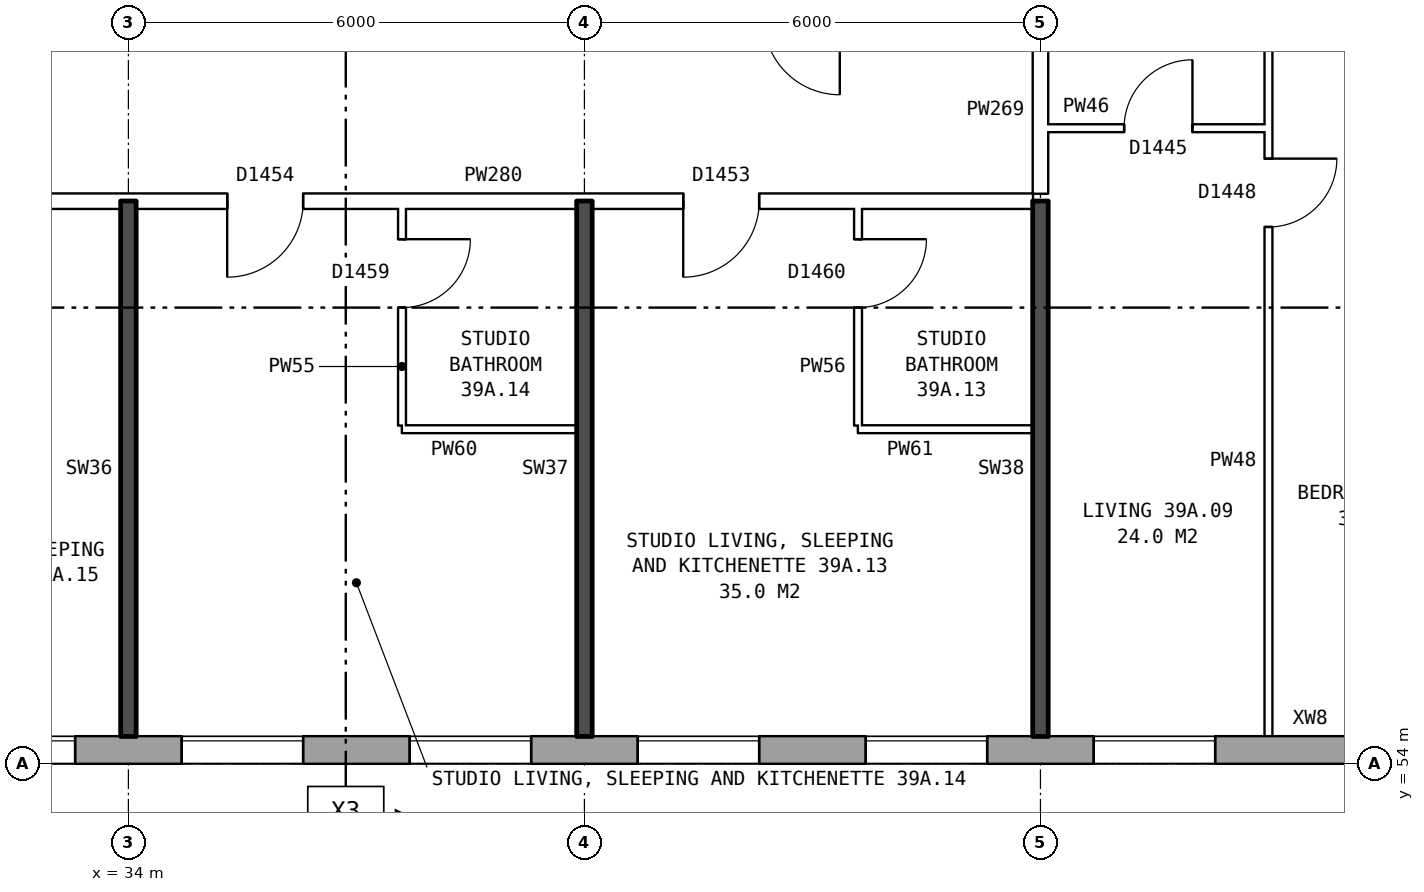
"""IFC4 building model, lengths in metres.
Left out: names, types, materials, properties, quantities, classifications, styles, units other than length and angle.
Written with IfcOpenShell. Run it as: python <this file> out.ifc"""

import sys

from ifc_helpers import new_model, si_unit, direction, frame, frame_2d, origin, place, context, subcontext, project, spatial, rectangle, extrude, element, fill, save


model = new_model("IFC4")
c1 = context("Model", 3, precision=1e-05, world=origin(), true_north=direction((0.0, 1.0)))
c2 = subcontext(c1, "Body", "Model", "MODEL_VIEW")
j1 = project(units=[si_unit("LENGTHUNIT", "METRE"), si_unit("PLANEANGLEUNIT", "RADIAN")], contexts=[c1])
p1 = place(None, origin())
s1 = spatial("IfcSite", under=j1, at=p1, CompositionType="ELEMENT")
p2 = place(p1, origin())
s2 = spatial("IfcBuilding", under=s1, at=p2, CompositionType="ELEMENT")
p3 = place(p2, frame((0.0, 0.0, 139.2)))
s3 = spatial("IfcBuildingStorey", under=s2, at=p3, CompositionType="ELEMENT", Elevation=139.2)
p4 = place(p3, frame((29.825, 54.18, 0.0), z_axis=(0.0, 0.0, 1.0), x_axis=(1.0, 0.0, 0.0)))
e1 = element("IfcWall", 1, at=p4, inside=s3, PredefinedType="STANDARD", context=c2, shape_type="SweptSolid", body=[
    extrude(rectangle(XDim=43.101, YDim=0.36, at=frame_2d((21.55, 0.0))), origin(), (0.0, 0.0, 1.0), 2.85),
])
p5 = place(p4, frame((1.875, 0.0, 0.8)))
e2 = element("IfcOpeningElement", 2, at=p5, cuts=e1, PredefinedType="OPENING", context=c2, shape_type="SweptSolid", body=[
    extrude(rectangle(XDim=1.6, YDim=1.8, at=frame_2d((0.8, 0.9))), frame((0.0, 0.19, 0.0), z_axis=(0.0, -1.0, 0.0), x_axis=(1.0, 0.0, 0.0)), (0.0, 0.0, 1.0), 0.38),
])
p6 = place(p4, frame((4.875, 0.0, 0.8)))
e3 = element("IfcOpeningElement", 3, at=p6, cuts=e1, PredefinedType="OPENING", context=c2, shape_type="SweptSolid", body=[
    extrude(rectangle(XDim=1.6, YDim=1.8, at=frame_2d((0.8, 0.9))), frame((0.0, 0.19, 0.0), z_axis=(0.0, -1.0, 0.0), x_axis=(1.0, 0.0, 0.0)), (0.0, 0.0, 1.0), 0.38),
])
p7 = place(p4, frame((7.875, 0.0, 0.8)))
e4 = element("IfcOpeningElement", 4, at=p7, cuts=e1, PredefinedType="OPENING", context=c2, shape_type="SweptSolid", body=[
    extrude(rectangle(XDim=1.6, YDim=1.8, at=frame_2d((0.8, 0.9))), frame((0.0, 0.19, 0.0), z_axis=(0.0, -1.0, 0.0), x_axis=(1.0, 0.0, 0.0)), (0.0, 0.0, 1.0), 0.38),
])
p8 = place(p4, frame((10.875, 0.0, 0.8)))
e5 = element("IfcOpeningElement", 5, at=p8, cuts=e1, PredefinedType="OPENING", context=c2, shape_type="SweptSolid", body=[
    extrude(rectangle(XDim=1.6, YDim=1.8, at=frame_2d((0.8, 0.9))), frame((0.0, 0.19, 0.0), z_axis=(0.0, -1.0, 0.0), x_axis=(1.0, 0.0, 0.0)), (0.0, 0.0, 1.0), 0.38),
])
p9 = place(p4, frame((13.875, 0.0, 0.8)))
e6 = element("IfcOpeningElement", 6, at=p9, cuts=e1, PredefinedType="OPENING", context=c2, shape_type="SweptSolid", body=[
    extrude(rectangle(XDim=1.6, YDim=1.8, at=frame_2d((0.8, 0.9))), frame((0.0, 0.19, 0.0), z_axis=(0.0, -1.0, 0.0), x_axis=(1.0, 0.0, 0.0)), (0.0, 0.0, 1.0), 0.38),
])
p10 = place(p4, frame((16.875, 0.0, 0.8)))
e7 = element("IfcOpeningElement", 7, at=p10, cuts=e1, PredefinedType="OPENING", context=c2, shape_type="SweptSolid", body=[
    extrude(rectangle(XDim=1.6, YDim=1.8, at=frame_2d((0.8, 0.9))), frame((0.0, 0.19, 0.0), z_axis=(0.0, -1.0, 0.0), x_axis=(1.0, 0.0, 0.0)), (0.0, 0.0, 1.0), 0.38),
])
p11 = place(p4, frame((20.975, 0.0, 0.15)))
e8 = element("IfcOpeningElement", 8, at=p11, cuts=e1, PredefinedType="OPENING", context=c2, shape_type="SweptSolid", body=[
    extrude(rectangle(XDim=1.0, YDim=1.5, at=frame_2d((0.5, 0.75))), frame((0.0, 0.19, 0.0), z_axis=(0.0, -1.0, 0.0), x_axis=(1.0, 0.0, 0.0)), (0.0, 0.0, 1.0), 0.38),
])
p12 = place(p4, frame((23.225, 0.0, 1.7)))
e9 = element("IfcOpeningElement", 9, at=p12, cuts=e1, PredefinedType="OPENING", context=c2, shape_type="SweptSolid", body=[
    extrude(rectangle(XDim=0.6, YDim=0.9, at=frame_2d((0.3, 0.45))), frame((0.0, 0.19, 0.0), z_axis=(0.0, -1.0, 0.0), x_axis=(1.0, 0.0, 0.0)), (0.0, 0.0, 1.0), 0.38),
])
p13 = place(p4, frame((25.875, 0.0, 0.8)))
e10 = element("IfcOpeningElement", 10, at=p13, cuts=e1, PredefinedType="OPENING", context=c2, shape_type="SweptSolid", body=[
    extrude(rectangle(XDim=1.6, YDim=1.8, at=frame_2d((0.8, 0.9))), frame((0.0, 0.19, 0.0), z_axis=(0.0, -1.0, 0.0), x_axis=(1.0, 0.0, 0.0)), (0.0, 0.0, 1.0), 0.38),
])
p14 = place(p4, frame((28.875, 0.0, 0.8)))
e11 = element("IfcOpeningElement", 11, at=p14, cuts=e1, PredefinedType="OPENING", context=c2, shape_type="SweptSolid", body=[
    extrude(rectangle(XDim=1.6, YDim=1.8, at=frame_2d((0.8, 0.9))), frame((0.0, 0.19, 0.0), z_axis=(0.0, -1.0, 0.0), x_axis=(1.0, 0.0, 0.0)), (0.0, 0.0, 1.0), 0.38),
])
p15 = place(p4, frame((31.875, 0.0, 0.8)))
e12 = element("IfcOpeningElement", 12, at=p15, cuts=e1, PredefinedType="OPENING", context=c2, shape_type="SweptSolid", body=[
    extrude(rectangle(XDim=1.6, YDim=1.8, at=frame_2d((0.8, 0.9))), frame((0.0, 0.19, 0.0), z_axis=(0.0, -1.0, 0.0), x_axis=(1.0, 0.0, 0.0)), (0.0, 0.0, 1.0), 0.38),
])
p16 = place(p4, frame((34.875, 0.0, 0.8)))
e13 = element("IfcOpeningElement", 13, at=p16, cuts=e1, PredefinedType="OPENING", context=c2, shape_type="SweptSolid", body=[
    extrude(rectangle(XDim=1.6, YDim=1.8, at=frame_2d((0.8, 0.9))), frame((0.0, 0.19, 0.0), z_axis=(0.0, -1.0, 0.0), x_axis=(1.0, 0.0, 0.0)), (0.0, 0.0, 1.0), 0.38),
])
p17 = place(p4, frame((37.875, 0.0, 0.8)))
e14 = element("IfcOpeningElement", 14, at=p17, cuts=e1, PredefinedType="OPENING", context=c2, shape_type="SweptSolid", body=[
    extrude(rectangle(XDim=1.6, YDim=1.8, at=frame_2d((0.8, 0.9))), frame((0.0, 0.19, 0.0), z_axis=(0.0, -1.0, 0.0), x_axis=(1.0, 0.0, 0.0)), (0.0, 0.0, 1.0), 0.38),
])
p18 = place(p4, frame((40.875, 0.0, 0.8)))
e15 = element("IfcOpeningElement", 15, at=p18, cuts=e1, PredefinedType="OPENING", context=c2, shape_type="SweptSolid", body=[
    extrude(rectangle(XDim=1.6, YDim=1.8, at=frame_2d((0.8, 0.9))), frame((0.0, 0.19, 0.0), z_axis=(0.0, -1.0, 0.0), x_axis=(1.0, 0.0, 0.0)), (0.0, 0.0, 1.0), 0.38),
])
p19 = place(p4, frame((24.225, 0.0, 0.8)))
e16 = element("IfcOpeningElement", 16, at=p19, cuts=e1, PredefinedType="OPENING", context=c2, shape_type="SweptSolid", body=[
    extrude(rectangle(XDim=0.8, YDim=1.8, at=frame_2d((0.4, 0.9))), frame((0.0, 0.19, 0.0), z_axis=(0.0, -1.0, 0.0), x_axis=(1.0, 0.0, 0.0)), (0.0, 0.0, 1.0), 0.38),
])
for number, where, z_axis, x_axis in (
    (17, (37.6, 58.4, 0.0), (0.0, 0.0, 1.0), (1.0, 0.0, 0.0)),
    (18, (43.6, 58.4, 0.0), (0.0, 0.0, 1.0), (1.0, 0.0, 0.0)),
):
    element("IfcWall", number, at=place(p3, frame(where, z_axis=z_axis, x_axis=x_axis)), inside=s3, PredefinedType="PARTITIONING", context=c2, shape_type="SweptSolid", body=[
        extrude(rectangle(XDim=2.3, YDim=0.1, at=frame_2d((1.15, 0.0))), origin(), (0.0, 0.0, 1.0), 2.85),
    ])
p20 = place(p3, frame((27.11, 61.4, 0.0), z_axis=(0.0, 0.0, 1.0), x_axis=(1.0, 0.0, 0.0)))
e19 = element("IfcWall", 19, at=p20, inside=s3, PredefinedType="PARTITIONING", context=c2, shape_type="SweptSolid", body=[
    extrude(rectangle(XDim=18.79, YDim=0.2, at=frame_2d((9.395, 0.0))), origin(), (0.0, 0.0, 1.0), 2.85),
])
p21 = place(p20, frame((14.19, 0.0, 0.0)))
e20 = element("IfcOpeningElement", 20, at=p21, cuts=e19, PredefinedType="OPENING", context=c2, shape_type="SweptSolid", body=[
    extrude(rectangle(XDim=1.0, YDim=2.1, at=frame_2d((0.5, 1.05))), frame((0.0, 0.11, 0.0), z_axis=(0.0, -1.0, 0.0), x_axis=(1.0, 0.0, 0.0)), (0.0, 0.0, 1.0), 0.22),
])
p22 = place(p20, frame((8.19, 0.0, 0.0)))
e21 = element("IfcOpeningElement", 21, at=p22, cuts=e19, PredefinedType="OPENING", context=c2, shape_type="SweptSolid", body=[
    extrude(rectangle(XDim=1.0, YDim=2.1, at=frame_2d((0.5, 1.05))), frame((0.0, 0.11, 0.0), z_axis=(0.0, -1.0, 0.0), x_axis=(1.0, 0.0, 0.0)), (0.0, 0.0, 1.0), 0.22),
])
p23 = place(p20, frame((4.59, 0.0, 0.0)))
e22 = element("IfcOpeningElement", 22, at=p23, cuts=e19, PredefinedType="OPENING", context=c2, shape_type="SweptSolid", body=[
    extrude(rectangle(XDim=1.0, YDim=2.1, at=frame_2d((0.5, 1.05))), frame((0.0, 0.11, 0.0), z_axis=(0.0, -1.0, 0.0), x_axis=(1.0, 0.0, 0.0)), (0.0, 0.0, 1.0), 0.22),
])
p24 = place(p3, frame((46.1, 62.36, 0.0), z_axis=(0.0, 0.0, 1.0), x_axis=(1.0, 0.0, 0.0)))
e23 = element("IfcWall", 23, at=p24, inside=s3, PredefinedType="PARTITIONING", context=c2, shape_type="SweptSolid", body=[
    extrude(rectangle(XDim=2.9, YDim=0.1, at=frame_2d((1.45, 0.0))), origin(), (0.0, 0.0, 1.0), 2.85),
])
p25 = place(p24, frame((1.0, 0.0, 0.0)))
e24 = element("IfcOpeningElement", 24, at=p25, cuts=e23, PredefinedType="OPENING", context=c2, shape_type="SweptSolid", body=[
    extrude(rectangle(XDim=0.9, YDim=2.1, at=frame_2d((0.45, 1.05))), frame((0.0, 0.06, 0.0), z_axis=(0.0, -1.0, 0.0), x_axis=(1.0, 0.0, 0.0)), (0.0, 0.0, 1.0), 0.12),
])
p26 = place(p3, frame((34.0, 54.36, 0.0), z_axis=(0.0, 0.0, 1.0), x_axis=(0.0, 1.0, 0.0)))
e25 = element("IfcWall", 25, at=p26, inside=s3, PredefinedType="SOLIDWALL", context=c2, shape_type="SweptSolid", body=[
    extrude(rectangle(XDim=7.04, YDim=0.2, at=frame_2d((3.52, 0.0))), origin(), (0.0, 0.0, 1.0), 2.85),
])
p27 = place(p3, frame((37.6, 58.45, 0.0), z_axis=(0.0, 0.0, 1.0), x_axis=(0.0, 1.0, 0.0)))
e26 = element("IfcWall", 26, at=p27, inside=s3, PredefinedType="PARTITIONING", context=c2, shape_type="SweptSolid", body=[
    extrude(rectangle(XDim=2.85, YDim=0.1, at=frame_2d((1.425, 0.0))), origin(), (0.0, 0.0, 1.0), 2.85),
])
p28 = place(p27, frame((1.55, 0.0, 0.0)))
e27 = element("IfcOpeningElement", 27, at=p28, cuts=e26, PredefinedType="OPENING", context=c2, shape_type="SweptSolid", body=[
    extrude(rectangle(XDim=0.9, YDim=2.1, at=frame_2d((0.45, 1.05))), frame((0.0, 0.06, 0.0), z_axis=(0.0, -1.0, 0.0), x_axis=(1.0, 0.0, 0.0)), (0.0, 0.0, 1.0), 0.12),
])
p29 = place(p3, frame((40.0, 54.36, 0.0), z_axis=(0.0, 0.0, 1.0), x_axis=(0.0, 1.0, 0.0)))
e28 = element("IfcWall", 28, at=p29, inside=s3, PredefinedType="SOLIDWALL", context=c2, shape_type="SweptSolid", body=[
    extrude(rectangle(XDim=7.04, YDim=0.2, at=frame_2d((3.52, 0.0))), origin(), (0.0, 0.0, 1.0), 2.85),
])
p30 = place(p3, frame((43.6, 58.45, 0.0), z_axis=(0.0, 0.0, 1.0), x_axis=(0.0, 1.0, 0.0)))
e29 = element("IfcWall", 29, at=p30, inside=s3, PredefinedType="PARTITIONING", context=c2, shape_type="SweptSolid", body=[
    extrude(rectangle(XDim=2.85, YDim=0.1, at=frame_2d((1.425, 0.0))), origin(), (0.0, 0.0, 1.0), 2.85),
])
p31 = place(p30, frame((1.55, 0.0, 0.0)))
e30 = element("IfcOpeningElement", 30, at=p31, cuts=e29, PredefinedType="OPENING", context=c2, shape_type="SweptSolid", body=[
    extrude(rectangle(XDim=0.9, YDim=2.1, at=frame_2d((0.45, 1.05))), frame((0.0, 0.06, 0.0), z_axis=(0.0, -1.0, 0.0), x_axis=(1.0, 0.0, 0.0)), (0.0, 0.0, 1.0), 0.12),
])
p32 = place(p3, frame((46.0, 54.36, 0.0), z_axis=(0.0, 0.0, 1.0), x_axis=(0.0, 1.0, 0.0)))
e31 = element("IfcWall", 31, at=p32, inside=s3, PredefinedType="SOLIDWALL", context=c2, shape_type="SweptSolid", body=[
    extrude(rectangle(XDim=7.04, YDim=0.2, at=frame_2d((3.52, 0.0))), origin(), (0.0, 0.0, 1.0), 2.85),
])
p33 = place(p3, frame((46.0, 61.5, 0.0), z_axis=(0.0, 0.0, 1.0), x_axis=(0.0, 1.0, 0.0)))
e32 = element("IfcWall", 32, at=p33, inside=s3, PredefinedType="PARTITIONING", context=c2, shape_type="SweptSolid", body=[
    extrude(rectangle(XDim=2.2, YDim=0.2, at=frame_2d((1.1, 0.0))), origin(), (0.0, 0.0, 1.0), 2.85),
])
p34 = place(p3, frame((49.0, 54.36, 0.0), z_axis=(0.0, 0.0, 1.0), x_axis=(0.0, 1.0, 0.0)))
e33 = element("IfcWall", 33, at=p34, inside=s3, PredefinedType="PARTITIONING", context=c2, shape_type="SweptSolid", body=[
    extrude(rectangle(XDim=14.34, YDim=0.1, at=frame_2d((7.17, 0.0))), origin(), (0.0, 0.0, 1.0), 2.85),
])
p35 = place(p34, frame((6.7, 0.0, 0.0)))
e34 = element("IfcOpeningElement", 34, at=p35, cuts=e33, PredefinedType="OPENING", context=c2, shape_type="SweptSolid", body=[
    extrude(rectangle(XDim=0.9, YDim=2.1, at=frame_2d((0.45, 1.05))), frame((0.0, 0.06, 0.0), z_axis=(0.0, -1.0, 0.0), x_axis=(1.0, 0.0, 0.0)), (0.0, 0.0, 1.0), 0.12),
])
p36 = place(p34, frame((13.04, 0.0, 0.0)))
e35 = element("IfcOpeningElement", 35, at=p36, cuts=e33, PredefinedType="OPENING", context=c2, shape_type="SweptSolid", body=[
    extrude(rectangle(XDim=0.9, YDim=2.1, at=frame_2d((0.45, 1.05))), frame((0.0, 0.06, 0.0), z_axis=(0.0, -1.0, 0.0), x_axis=(1.0, 0.0, 0.0)), (0.0, 0.0, 1.0), 0.12),
])
p37 = place(p5, origin())
e36 = element("IfcWindow", 36, at=p37, inside=s3, PartitioningType="SINGLE_PANEL", PredefinedType="WINDOW", context=c2, shape_type="SweptSolid", body=[
    extrude(rectangle(XDim=1.6, YDim=1.8, at=frame_2d((0.8, 0.9))), frame((0.0, 0.15, 0.0), z_axis=(0.0, -1.0, 0.0), x_axis=(1.0, 0.0, 0.0)), (0.0, 0.0, 1.0), 0.06),
])
fill(e2, e36)
p38 = place(p6, origin())
e37 = element("IfcWindow", 37, at=p38, inside=s3, PartitioningType="SINGLE_PANEL", PredefinedType="WINDOW", context=c2, shape_type="SweptSolid", body=[
    extrude(rectangle(XDim=1.6, YDim=1.8, at=frame_2d((0.8, 0.9))), frame((0.0, 0.15, 0.0), z_axis=(0.0, -1.0, 0.0), x_axis=(1.0, 0.0, 0.0)), (0.0, 0.0, 1.0), 0.06),
])
fill(e3, e37)
p39 = place(p7, origin())
e38 = element("IfcWindow", 38, at=p39, inside=s3, PartitioningType="SINGLE_PANEL", PredefinedType="WINDOW", context=c2, shape_type="SweptSolid", body=[
    extrude(rectangle(XDim=1.6, YDim=1.8, at=frame_2d((0.8, 0.9))), frame((0.0, 0.15, 0.0), z_axis=(0.0, -1.0, 0.0), x_axis=(1.0, 0.0, 0.0)), (0.0, 0.0, 1.0), 0.06),
])
fill(e4, e38)
p40 = place(p8, origin())
e39 = element("IfcWindow", 39, at=p40, inside=s3, PartitioningType="SINGLE_PANEL", PredefinedType="WINDOW", context=c2, shape_type="SweptSolid", body=[
    extrude(rectangle(XDim=1.6, YDim=1.8, at=frame_2d((0.8, 0.9))), frame((0.0, 0.15, 0.0), z_axis=(0.0, -1.0, 0.0), x_axis=(1.0, 0.0, 0.0)), (0.0, 0.0, 1.0), 0.06),
])
fill(e5, e39)
p41 = place(p9, origin())
e40 = element("IfcWindow", 40, at=p41, inside=s3, PartitioningType="SINGLE_PANEL", PredefinedType="WINDOW", context=c2, shape_type="SweptSolid", body=[
    extrude(rectangle(XDim=1.6, YDim=1.8, at=frame_2d((0.8, 0.9))), frame((0.0, 0.15, 0.0), z_axis=(0.0, -1.0, 0.0), x_axis=(1.0, 0.0, 0.0)), (0.0, 0.0, 1.0), 0.06),
])
fill(e6, e40)
p42 = place(p10, origin())
e41 = element("IfcWindow", 41, at=p42, inside=s3, PartitioningType="SINGLE_PANEL", PredefinedType="WINDOW", context=c2, shape_type="SweptSolid", body=[
    extrude(rectangle(XDim=1.6, YDim=1.8, at=frame_2d((0.8, 0.9))), frame((0.0, 0.15, 0.0), z_axis=(0.0, -1.0, 0.0), x_axis=(1.0, 0.0, 0.0)), (0.0, 0.0, 1.0), 0.06),
])
fill(e7, e41)
p43 = place(p35, frame((0.9, 0.0, 0.0), z_axis=(0.0, 0.0, 1.0), x_axis=(-1.0, 0.0, 0.0)))
e42 = element("IfcDoor", 42, at=p43, inside=s3, OperationType="SINGLE_SWING_LEFT", PredefinedType="DOOR", context=c2, shape_type="SweptSolid", body=[
    extrude(rectangle(XDim=0.9, YDim=2.1, at=frame_2d((0.45, 1.05))), frame((0.0, 0.025, 0.0), z_axis=(0.0, -1.0, 0.0), x_axis=(1.0, 0.0, 0.0)), (0.0, 0.0, 1.0), 0.05),
])
fill(e34, e42)
p44 = place(p25, origin())
e43 = element("IfcDoor", 43, at=p44, inside=s3, OperationType="SINGLE_SWING_RIGHT", PredefinedType="DOOR", context=c2, shape_type="SweptSolid", body=[
    extrude(rectangle(XDim=0.9, YDim=2.1, at=frame_2d((0.45, 1.05))), frame((0.0, 0.025, 0.0), z_axis=(0.0, -1.0, 0.0), x_axis=(1.0, 0.0, 0.0)), (0.0, 0.0, 1.0), 0.05),
])
fill(e24, e43)
p45 = place(p21, frame((1.0, 0.0, 0.0), z_axis=(0.0, 0.0, 1.0), x_axis=(-1.0, 0.0, 0.0)))
e44 = element("IfcDoor", 44, at=p45, inside=s3, OperationType="SINGLE_SWING_RIGHT", PredefinedType="DOOR", context=c2, shape_type="SweptSolid", body=[
    extrude(rectangle(XDim=1.0, YDim=2.1, at=frame_2d((0.5, 1.05))), frame((0.0, 0.025, 0.0), z_axis=(0.0, -1.0, 0.0), x_axis=(1.0, 0.0, 0.0)), (0.0, 0.0, 1.0), 0.05),
])
fill(e20, e44)
p46 = place(p31, frame((0.9, 0.0, 0.0), z_axis=(0.0, 0.0, 1.0), x_axis=(-1.0, 0.0, 0.0)))
e45 = element("IfcDoor", 45, at=p46, inside=s3, OperationType="SINGLE_SWING_LEFT", PredefinedType="DOOR", context=c2, shape_type="SweptSolid", body=[
    extrude(rectangle(XDim=0.9, YDim=2.1, at=frame_2d((0.45, 1.05))), frame((0.0, 0.025, 0.0), z_axis=(0.0, -1.0, 0.0), x_axis=(1.0, 0.0, 0.0)), (0.0, 0.0, 1.0), 0.05),
])
fill(e30, e45)
p47 = place(p22, frame((1.0, 0.0, 0.0), z_axis=(0.0, 0.0, 1.0), x_axis=(-1.0, 0.0, 0.0)))
e46 = element("IfcDoor", 46, at=p47, inside=s3, OperationType="SINGLE_SWING_RIGHT", PredefinedType="DOOR", context=c2, shape_type="SweptSolid", body=[
    extrude(rectangle(XDim=1.0, YDim=2.1, at=frame_2d((0.5, 1.05))), frame((0.0, 0.025, 0.0), z_axis=(0.0, -1.0, 0.0), x_axis=(1.0, 0.0, 0.0)), (0.0, 0.0, 1.0), 0.05),
])
fill(e21, e46)
p48 = place(p28, frame((0.9, 0.0, 0.0), z_axis=(0.0, 0.0, 1.0), x_axis=(-1.0, 0.0, 0.0)))
e47 = element("IfcDoor", 47, at=p48, inside=s3, OperationType="SINGLE_SWING_LEFT", PredefinedType="DOOR", context=c2, shape_type="SweptSolid", body=[
    extrude(rectangle(XDim=0.9, YDim=2.1, at=frame_2d((0.45, 1.05))), frame((0.0, 0.025, 0.0), z_axis=(0.0, -1.0, 0.0), x_axis=(1.0, 0.0, 0.0)), (0.0, 0.0, 1.0), 0.05),
])
fill(e27, e47)
save(model, sys.argv[1])
